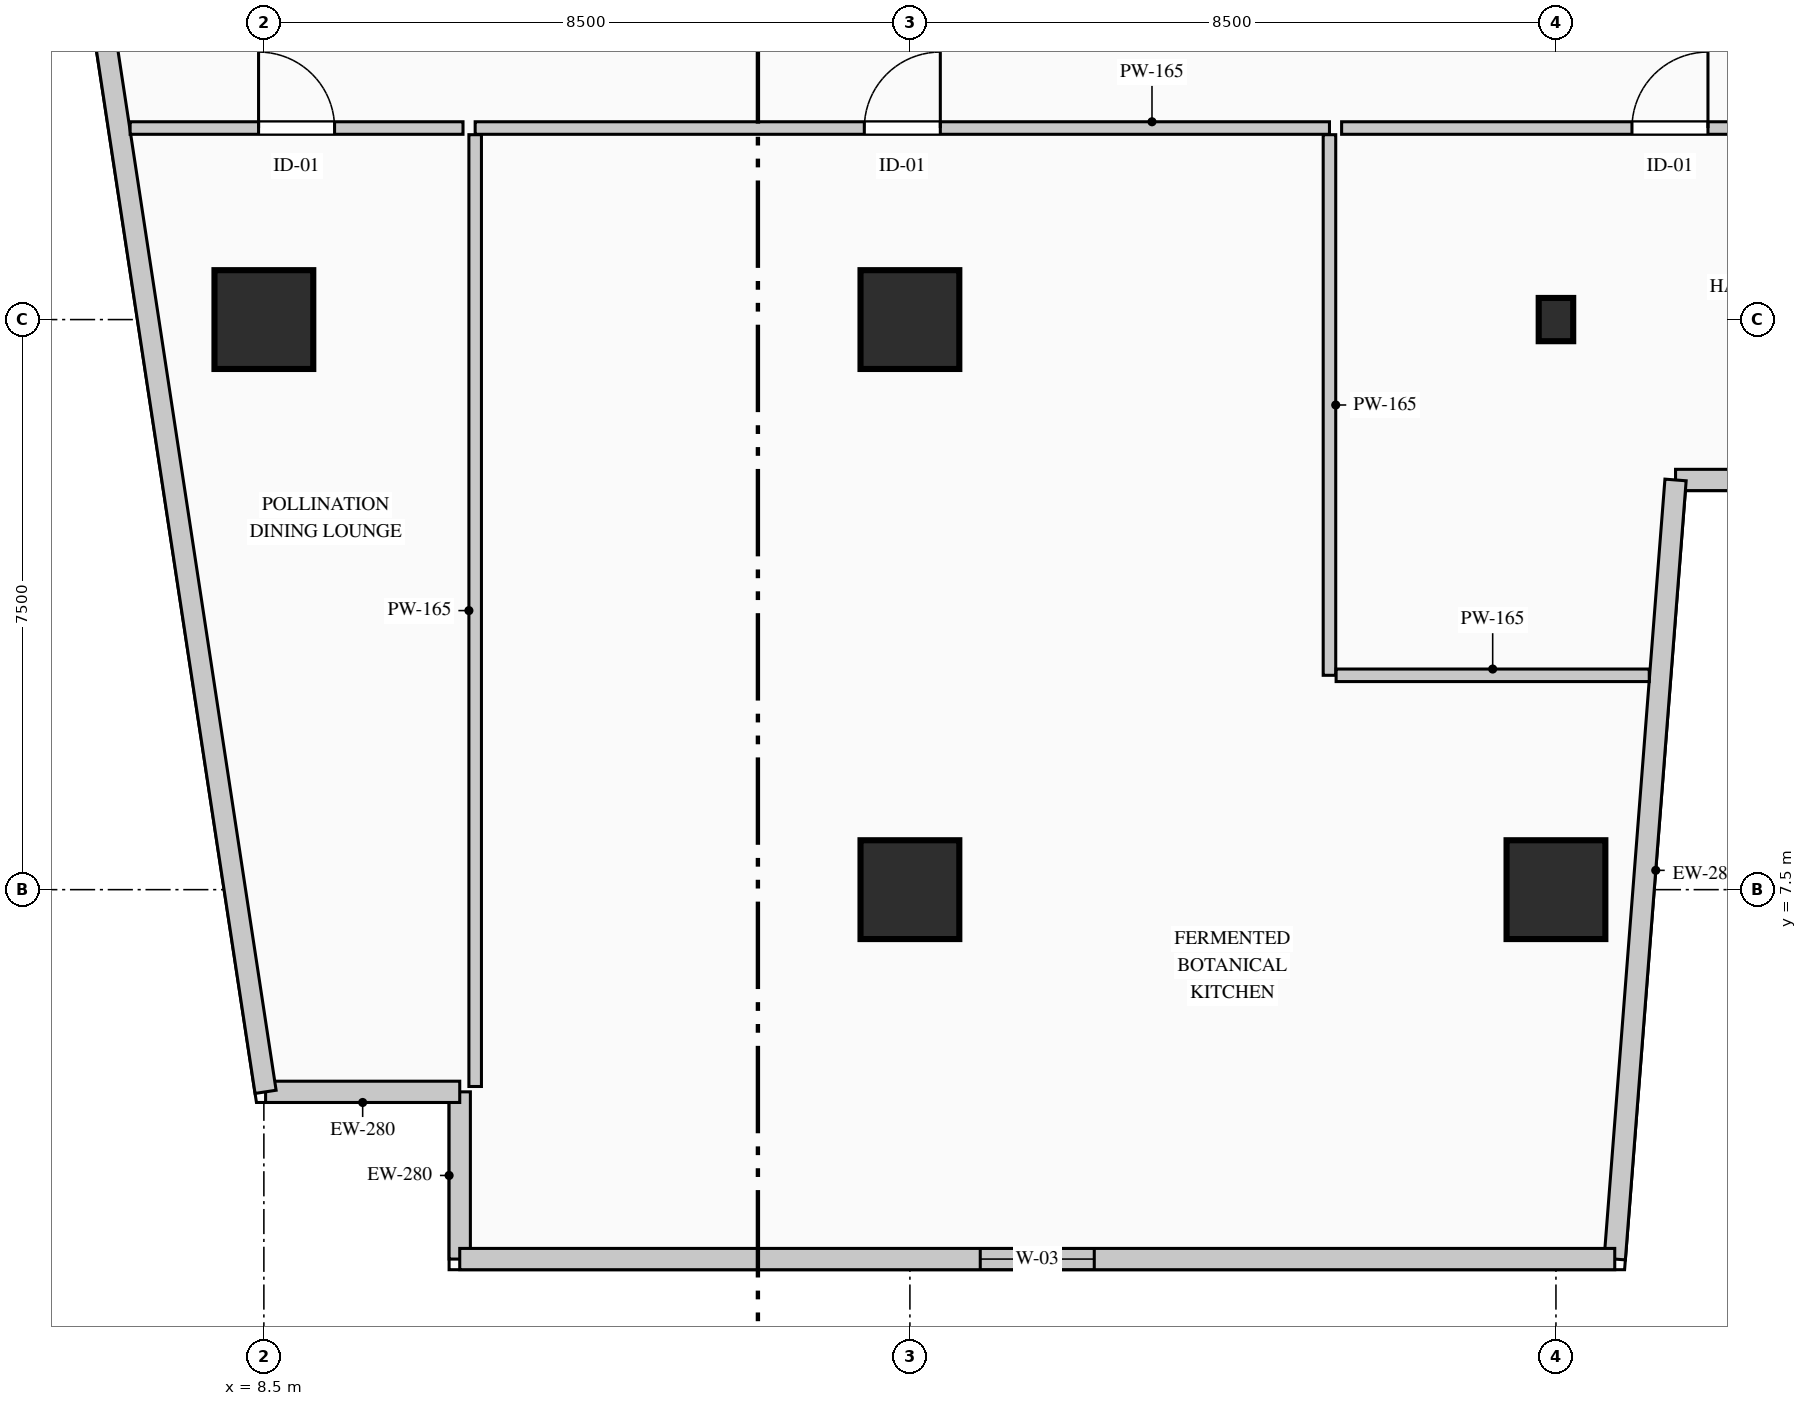
"""IFC4 building model, lengths in metres.
Left out: names, types, materials, properties, quantities, classifications, styles, units other than length and angle.
Written with IfcOpenShell. Run it as: python <this file> out.ifc"""

import sys

from ifc_helpers import new_model, si_unit, direction, frame, frame_2d, origin, origin_2d, place, context, subcontext, project, spatial, rectangle, i_section, extrude, element, fill, save


model = new_model("IFC4")
c1 = context("Model", 3, precision=1e-05, world=origin(), true_north=direction((0.0, 1.0)))
c2 = subcontext(c1, "Body", "Model", "MODEL_VIEW")
j1 = project(units=[si_unit("LENGTHUNIT", "METRE"), si_unit("PLANEANGLEUNIT", "RADIAN")], contexts=[c1])
p1 = place(None, origin())
s1 = spatial("IfcSite", under=j1, at=p1, CompositionType="ELEMENT")
p2 = place(p1, origin())
s2 = spatial("IfcBuilding", under=s1, at=p2, CompositionType="ELEMENT")
p3 = place(p2, frame((0.0, 0.0, 57.8)))
s3 = spatial("IfcBuildingStorey", under=s2, at=p3, CompositionType="ELEMENT", Elevation=57.8)
for number, where, z_axis, x_axis in (
    (1, (8.5, 15.0, 0.0), (0.0, 0.0, 1.0), (1.0, 0.0, 0.0)),
    (2, (17.0, 7.5, 0.0), (0.0, 0.0, 1.0), (1.0, 0.0, 0.0)),
    (3, (17.0, 15.0, 0.0), (0.0, 0.0, 1.0), (1.0, 0.0, 0.0)),
    (4, (25.5, 7.5, 0.0), (0.0, 0.0, 1.0), (1.0, 0.0, 0.0)),
):
    element("IfcColumn", number, at=place(p3, frame(where, z_axis=z_axis, x_axis=x_axis)), inside=s3, PredefinedType="COLUMN", context=c2, shape_type="SweptSolid", body=[
        extrude(rectangle(XDim=1.3, YDim=1.3, at=origin_2d()), origin(), (0.0, 0.0, 1.0), 4.4),
    ])
p4 = place(p3, frame((25.5, 15.0, 0.0), z_axis=(0.0, 0.0, 1.0), x_axis=(1.0, 0.0, 0.0)))
e5 = element("IfcColumn", 5, at=p4, inside=s3, PredefinedType="COLUMN", context=c2, shape_type="SweptSolid", body=[
    extrude(i_section(OverallWidth=0.454, OverallDepth=0.569, WebThickness=0.078, FlangeThickness=0.08, FilletRadius=0.015, at=origin_2d()), origin(), (0.0, 0.0, 1.0), 4.4),
])
p5 = place(p3, frame((11.077, 2.64, 0.0), z_axis=(0.0, 0.0, 1.0), x_axis=(0.0, 1.0, 0.0)))
e6 = element("IfcWall", 6, at=p5, inside=s3, PredefinedType="STANDARD", context=c2, shape_type="SweptSolid", body=[
    extrude(rectangle(XDim=2.2, YDim=0.28, at=frame_2d((1.1, 0.0))), origin(), (0.0, 0.0, 1.0), 4.1),
])
p6 = place(p3, frame((11.077, 4.84, 0.0), z_axis=(0.0, 0.0, 1.0), x_axis=(-1.0, 0.0, 0.0)))
e7 = element("IfcWall", 7, at=p6, inside=s3, PredefinedType="STANDARD", context=c2, shape_type="SweptSolid", body=[
    extrude(rectangle(XDim=2.554, YDim=0.28, at=frame_2d((1.277, 0.0))), origin(), (0.0, 0.0, 1.0), 4.1),
])
p7 = place(p3, frame((8.523, 4.84, 0.0), z_axis=(0.0, 0.0, 1.0), x_axis=(-0.150394554312, 0.988626055712, 0.0)))
e8 = element("IfcWall", 8, at=p7, inside=s3, PredefinedType="STANDARD", context=c2, shape_type="SweptSolid", body=[
    extrude(rectangle(XDim=36.738, YDim=0.28, at=frame_2d((18.369, 0.0))), origin(), (0.0, 0.0, 1.0), 4.1),
])
p8 = place(p7, frame((22.762, 0.0, 0.9)))
e9 = element("IfcOpeningElement", 9, at=p8, cuts=e8, PredefinedType="OPENING", context=c2, shape_type="SweptSolid", body=[
    extrude(rectangle(XDim=1.5, YDim=1.8, at=frame_2d((0.75, 0.9))), frame((0.0, 0.15, 0.0), z_axis=(0.0, -1.0, 0.0), x_axis=(1.0, 0.0, 0.0)), (0.0, 0.0, 1.0), 0.3),
])
p9 = place(p3, frame((35.77, 12.89, 0.0), z_axis=(0.0, 0.0, 1.0), x_axis=(-1.0, 0.0, 0.0)))
e10 = element("IfcWall", 10, at=p9, inside=s3, PredefinedType="STANDARD", context=c2, shape_type="SweptSolid", body=[
    extrude(rectangle(XDim=8.697, YDim=0.28, at=frame_2d((4.348, 0.0))), origin(), (0.0, 0.0, 1.0), 4.1),
])
p10 = place(p9, frame((5.511, 0.0, 0.9)))
e11 = element("IfcOpeningElement", 11, at=p10, cuts=e10, PredefinedType="OPENING", context=c2, shape_type="SweptSolid", body=[
    extrude(rectangle(XDim=1.5, YDim=1.8, at=frame_2d((0.75, 0.9))), frame((0.0, 0.15, 0.0), z_axis=(0.0, -1.0, 0.0), x_axis=(1.0, 0.0, 0.0)), (0.0, 0.0, 1.0), 0.3),
])
p11 = place(p3, frame((27.073, 12.89, 0.0), z_axis=(0.0, 0.0, 1.0), x_axis=(-0.077816860153, -0.996967670627, 0.0)))
e12 = element("IfcWall", 12, at=p11, inside=s3, PredefinedType="STANDARD", context=c2, shape_type="SweptSolid", body=[
    extrude(rectangle(XDim=10.281, YDim=0.28, at=frame_2d((5.141, 0.0))), origin(), (0.0, 0.0, 1.0), 4.1),
])
p12 = place(p3, frame((26.273, 2.64, 0.0), z_axis=(0.0, 0.0, 1.0), x_axis=(-1.0, 0.0, 0.0)))
e13 = element("IfcWall", 13, at=p12, inside=s3, PredefinedType="STANDARD", context=c2, shape_type="SweptSolid", body=[
    extrude(rectangle(XDim=15.197, YDim=0.28, at=frame_2d((7.598, 0.0))), origin(), (0.0, 0.0, 1.0), 4.1),
])
p13 = place(p12, frame((6.848, 0.0, 0.9)))
e14 = element("IfcOpeningElement", 14, at=p13, cuts=e13, PredefinedType="OPENING", context=c2, shape_type="SweptSolid", body=[
    extrude(rectangle(XDim=1.5, YDim=1.8, at=frame_2d((0.75, 0.9))), frame((0.0, 0.15, 0.0), z_axis=(0.0, -1.0, 0.0), x_axis=(1.0, 0.0, 0.0)), (0.0, 0.0, 1.0), 0.3),
])
p14 = place(p3, frame((11.28, 17.52, 0.0), z_axis=(0.0, 0.0, 1.0), x_axis=(1.0, 0.0, 0.0)))
e15 = element("IfcWall", 15, at=p14, inside=s3, PredefinedType="PARTITIONING", context=c2, shape_type="SweptSolid", body=[
    extrude(rectangle(XDim=11.24, YDim=0.165, at=frame_2d((5.62, 0.0))), origin(), (0.0, 0.0, 1.0), 4.1),
])
p15 = place(p14, frame((5.12, 0.0, 0.0)))
e16 = element("IfcOpeningElement", 16, at=p15, cuts=e15, PredefinedType="OPENING", context=c2, shape_type="SweptSolid", body=[
    extrude(rectangle(XDim=1.0, YDim=2.15, at=frame_2d((0.5, 1.075))), frame((0.0, 0.093, 0.0), z_axis=(0.0, -1.0, 0.0), x_axis=(1.0, 0.0, 0.0)), (0.0, 0.0, 1.0), 0.185),
])
p16 = place(p3, frame((22.52, 17.433, 0.0), z_axis=(0.0, 0.0, 1.0), x_axis=(0.0, -1.0, 0.0)))
e17 = element("IfcWall", 17, at=p16, inside=s3, PredefinedType="PARTITIONING", context=c2, shape_type="SweptSolid", body=[
    extrude(rectangle(XDim=7.113, YDim=0.165, at=frame_2d((3.556, 0.0))), origin(), (0.0, 0.0, 1.0), 3.685),
])
p17 = place(p3, frame((22.607, 10.32, 0.0), z_axis=(0.0, 0.0, 1.0), x_axis=(1.0, 0.0, 0.0)))
e18 = element("IfcWall", 18, at=p17, inside=s3, PredefinedType="PARTITIONING", context=c2, shape_type="SweptSolid", body=[
    extrude(rectangle(XDim=4.12, YDim=0.165, at=frame_2d((2.06, 0.0))), origin(), (0.0, 0.0, 1.0), 4.1),
])
p18 = place(p3, frame((11.28, 4.91, 0.0), z_axis=(0.0, 0.0, 1.0), x_axis=(0.0, 1.0, 0.0)))
e19 = element("IfcWall", 19, at=p18, inside=s3, PredefinedType="PARTITIONING", context=c2, shape_type="SweptSolid", body=[
    extrude(rectangle(XDim=12.522, YDim=0.165, at=frame_2d((6.261, 0.0))), origin(), (0.0, 0.0, 1.0), 4.1),
])
p19 = place(p3, frame((6.74, 17.52, 0.0), z_axis=(0.0, 0.0, 1.0), x_axis=(1.0, 0.0, 0.0)))
e20 = element("IfcWall", 20, at=p19, inside=s3, PredefinedType="PARTITIONING", context=c2, shape_type="SweptSolid", body=[
    extrude(rectangle(XDim=4.38, YDim=0.165, at=frame_2d((2.19, 0.0))), origin(), (0.0, 0.0, 1.0), 4.1),
])
p20 = place(p19, frame((1.69, 0.0, 0.0)))
e21 = element("IfcOpeningElement", 21, at=p20, cuts=e20, PredefinedType="OPENING", context=c2, shape_type="SweptSolid", body=[
    extrude(rectangle(XDim=1.0, YDim=2.15, at=frame_2d((0.5, 1.075))), frame((0.0, 0.093, 0.0), z_axis=(0.0, -1.0, 0.0), x_axis=(1.0, 0.0, 0.0)), (0.0, 0.0, 1.0), 0.185),
])
p21 = place(p3, frame((22.68, 17.52, 0.0), z_axis=(0.0, 0.0, 1.0), x_axis=(1.0, 0.0, 0.0)))
e22 = element("IfcWall", 22, at=p21, inside=s3, PredefinedType="PARTITIONING", context=c2, shape_type="SweptSolid", body=[
    extrude(rectangle(XDim=8.64, YDim=0.165, at=frame_2d((4.32, 0.0))), origin(), (0.0, 0.0, 1.0), 3.685),
])
p22 = place(p21, frame((3.82, 0.0, 0.0)))
e23 = element("IfcOpeningElement", 23, at=p22, cuts=e22, PredefinedType="OPENING", context=c2, shape_type="SweptSolid", body=[
    extrude(rectangle(XDim=1.0, YDim=2.15, at=frame_2d((0.5, 1.075))), frame((0.0, 0.093, 0.0), z_axis=(0.0, -1.0, 0.0), x_axis=(1.0, 0.0, 0.0)), (0.0, 0.0, 1.0), 0.185),
])
p23 = place(p13, origin())
e24 = element("IfcWindow", 24, at=p23, inside=s3, PartitioningType="SINGLE_PANEL", PredefinedType="WINDOW", context=c2, shape_type="SweptSolid", body=[
    extrude(rectangle(XDim=1.5, YDim=1.8, at=frame_2d((0.75, 0.9))), frame((0.0, 0.03, 0.0), z_axis=(0.0, -1.0, 0.0), x_axis=(1.0, 0.0, 0.0)), (0.0, 0.0, 1.0), 0.06),
])
fill(e14, e24)
p24 = place(p15, origin())
e25 = element("IfcDoor", 25, at=p24, inside=s3, OperationType="SINGLE_SWING_RIGHT", PredefinedType="DOOR", context=c2, shape_type="SweptSolid", body=[
    extrude(rectangle(XDim=1.0, YDim=2.15, at=frame_2d((0.5, 1.075))), frame((0.0, 0.025, 0.0), z_axis=(0.0, -1.0, 0.0), x_axis=(1.0, 0.0, 0.0)), (0.0, 0.0, 1.0), 0.05),
])
fill(e16, e25)
p25 = place(p20, origin())
e26 = element("IfcDoor", 26, at=p25, inside=s3, OperationType="SINGLE_SWING_LEFT", PredefinedType="DOOR", context=c2, shape_type="SweptSolid", body=[
    extrude(rectangle(XDim=1.0, YDim=2.15, at=frame_2d((0.5, 1.075))), frame((0.0, 0.025, 0.0), z_axis=(0.0, -1.0, 0.0), x_axis=(1.0, 0.0, 0.0)), (0.0, 0.0, 1.0), 0.05),
])
fill(e21, e26)
p26 = place(p22, origin())
e27 = element("IfcDoor", 27, at=p26, inside=s3, OperationType="SINGLE_SWING_RIGHT", PredefinedType="DOOR", context=c2, shape_type="SweptSolid", body=[
    extrude(rectangle(XDim=1.0, YDim=2.15, at=frame_2d((0.5, 1.075))), frame((0.0, 0.025, 0.0), z_axis=(0.0, -1.0, 0.0), x_axis=(1.0, 0.0, 0.0)), (0.0, 0.0, 1.0), 0.05),
])
fill(e23, e27)
save(model, sys.argv[1])
